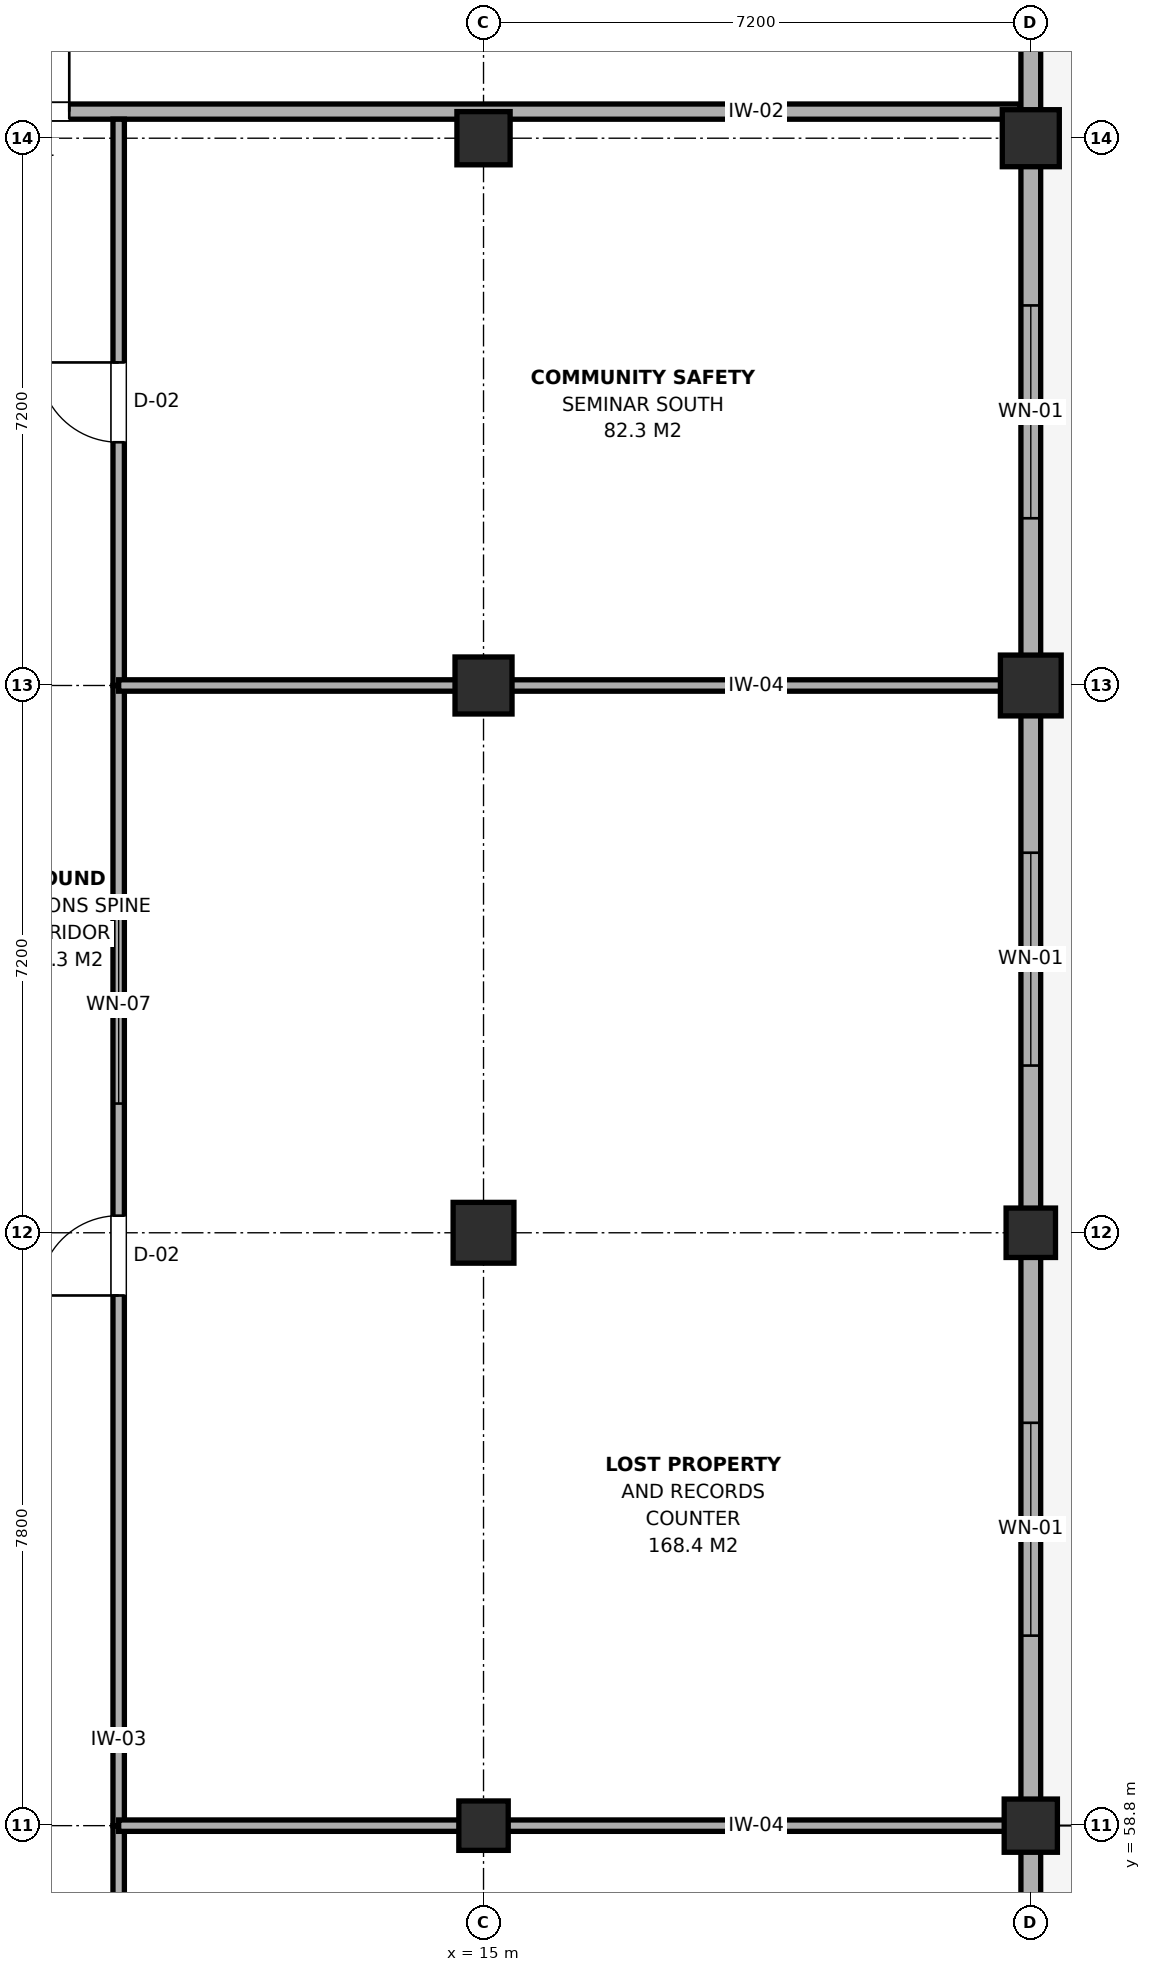
"""IFC4 building model, lengths in metres.
Left out: names, types, materials, properties, quantities, classifications, styles, units other than length and angle.
Written with IfcOpenShell. Run it as: python <this file> out.ifc"""

import sys

from ifc_helpers import new_model, si_unit, direction, frame, frame_2d, origin, origin_2d, place, context, subcontext, project, spatial, rectangle, extrude, element, fill, save


model = new_model("IFC4")
c1 = context("Model", 3, precision=1e-05, world=origin(), true_north=direction((0.0, 1.0)))
c2 = subcontext(c1, "Body", "Model", "MODEL_VIEW")
j1 = project(units=[si_unit("LENGTHUNIT", "METRE"), si_unit("PLANEANGLEUNIT", "RADIAN")], contexts=[c1])
p1 = place(None, origin())
s1 = spatial("IfcSite", under=j1, at=p1, CompositionType="ELEMENT")
p2 = place(p1, origin())
s2 = spatial("IfcBuilding", under=s1, at=p2, CompositionType="ELEMENT")
p3 = place(p2, origin())
s3 = spatial("IfcBuildingStorey", under=s2, at=p3, CompositionType="ELEMENT", Elevation=0.0)
p4 = place(p3, frame((15.0, 58.8, 0.0), z_axis=(0.0, 0.0, 1.0), x_axis=(1.0, 0.0, 0.0)))
e1 = element("IfcColumn", 1, at=p4, inside=s3, PredefinedType="COLUMN", context=c2, shape_type="SweptSolid", body=[
    extrude(rectangle(XDim=0.65, YDim=0.65, at=origin_2d()), origin(), (0.0, 0.0, 1.0), 4.8),
])
p5 = place(p3, frame((15.0, 66.6, 0.0), z_axis=(0.0, 0.0, 1.0), x_axis=(1.0, 0.0, 0.0)))
e2 = element("IfcColumn", 2, at=p5, inside=s3, PredefinedType="COLUMN", context=c2, shape_type="SweptSolid", body=[
    extrude(rectangle(XDim=0.8, YDim=0.8, at=origin_2d()), origin(), (0.0, 0.0, 1.0), 4.8),
])
p6 = place(p3, frame((15.0, 73.8, 0.0), z_axis=(0.0, 0.0, 1.0), x_axis=(1.0, 0.0, 0.0)))
e3 = element("IfcColumn", 3, at=p6, inside=s3, PredefinedType="COLUMN", context=c2, shape_type="SweptSolid", body=[
    extrude(rectangle(XDim=0.75, YDim=0.75, at=origin_2d()), origin(), (0.0, 0.0, 1.0), 4.8),
])
for number, where, z_axis, x_axis in (
    (4, (15.0, 81.0, 0.0), (0.0, 0.0, 1.0), (1.0, 0.0, 0.0)),
    (5, (22.2, 58.8, 0.0), (0.0, 0.0, 1.0), (1.0, 0.0, 0.0)),
):
    element("IfcColumn", number, at=place(p3, frame(where, z_axis=z_axis, x_axis=x_axis)), inside=s3, PredefinedType="COLUMN", context=c2, shape_type="SweptSolid", body=[
        extrude(rectangle(XDim=0.7, YDim=0.7, at=origin_2d()), origin(), (0.0, 0.0, 1.0), 4.8),
    ])
p7 = place(p3, frame((22.2, 66.6, 0.0), z_axis=(0.0, 0.0, 1.0), x_axis=(1.0, 0.0, 0.0)))
e6 = element("IfcColumn", 6, at=p7, inside=s3, PredefinedType="COLUMN", context=c2, shape_type="SweptSolid", body=[
    extrude(rectangle(XDim=0.65, YDim=0.65, at=origin_2d()), origin(), (0.0, 0.0, 1.0), 4.8),
])
p8 = place(p3, frame((22.2, 73.8, 0.0), z_axis=(0.0, 0.0, 1.0), x_axis=(1.0, 0.0, 0.0)))
e7 = element("IfcColumn", 7, at=p8, inside=s3, PredefinedType="COLUMN", context=c2, shape_type="SweptSolid", body=[
    extrude(rectangle(XDim=0.8, YDim=0.8, at=origin_2d()), origin(), (0.0, 0.0, 1.0), 4.8),
])
p9 = place(p3, frame((22.2, 81.0, 0.0), z_axis=(0.0, 0.0, 1.0), x_axis=(1.0, 0.0, 0.0)))
e8 = element("IfcColumn", 8, at=p9, inside=s3, PredefinedType="COLUMN", context=c2, shape_type="SweptSolid", body=[
    extrude(rectangle(XDim=0.75, YDim=0.75, at=origin_2d()), origin(), (0.0, 0.0, 1.0), 4.8),
])
p10 = place(p3, frame((22.2, 53.2, 0.0), z_axis=(0.0, 0.0, 1.0), x_axis=(0.0, 1.0, 0.0)))
e9 = element("IfcWall", 9, at=p10, inside=s3, PredefinedType="SOLIDWALL", context=c2, shape_type="SweptSolid", body=[
    extrude(rectangle(XDim=5.6, YDim=0.26, at=frame_2d((2.8, 0.0))), origin(), (0.0, 0.0, 1.0), 3.955),
])
p11 = place(p10, frame((1.4, 0.0, 0.9)))
e10 = element("IfcOpeningElement", 10, at=p11, cuts=e9, PredefinedType="OPENING", context=c2, shape_type="SweptSolid", body=[
    extrude(rectangle(XDim=2.8, YDim=2.2, at=frame_2d((1.4, 1.1))), frame((0.0, 0.145, 0.0), z_axis=(0.0, -1.0, 0.0), x_axis=(1.0, 0.0, 0.0)), (0.0, 0.0, 1.0), 0.29),
])
p12 = place(p3, frame((22.2, 58.8, 0.0), z_axis=(0.0, 0.0, 1.0), x_axis=(0.0, 1.0, 0.0)))
e11 = element("IfcWall", 11, at=p12, inside=s3, PredefinedType="SOLIDWALL", context=c2, shape_type="SweptSolid", body=[
    extrude(rectangle(XDim=7.8, YDim=0.26, at=frame_2d((3.9, 0.0))), origin(), (0.0, 0.0, 1.0), 4.005),
])
p13 = place(p12, frame((2.5, 0.0, 0.9)))
e12 = element("IfcOpeningElement", 12, at=p13, cuts=e11, PredefinedType="OPENING", context=c2, shape_type="SweptSolid", body=[
    extrude(rectangle(XDim=2.8, YDim=2.2, at=frame_2d((1.4, 1.1))), frame((0.0, 0.145, 0.0), z_axis=(0.0, -1.0, 0.0), x_axis=(1.0, 0.0, 0.0)), (0.0, 0.0, 1.0), 0.29),
])
p14 = place(p3, frame((22.2, 66.6, 0.0), z_axis=(0.0, 0.0, 1.0), x_axis=(0.0, 1.0, 0.0)))
e13 = element("IfcWall", 13, at=p14, inside=s3, PredefinedType="SOLIDWALL", context=c2, shape_type="SweptSolid", body=[
    extrude(rectangle(XDim=7.2, YDim=0.26, at=frame_2d((3.6, 0.0))), origin(), (0.0, 0.0, 1.0), 4.055),
])
p15 = place(p14, frame((2.2, 0.0, 0.9)))
e14 = element("IfcOpeningElement", 14, at=p15, cuts=e13, PredefinedType="OPENING", context=c2, shape_type="SweptSolid", body=[
    extrude(rectangle(XDim=2.8, YDim=2.2, at=frame_2d((1.4, 1.1))), frame((0.0, 0.145, 0.0), z_axis=(0.0, -1.0, 0.0), x_axis=(1.0, 0.0, 0.0)), (0.0, 0.0, 1.0), 0.29),
])
p16 = place(p3, frame((22.2, 73.8, 0.0), z_axis=(0.0, 0.0, 1.0), x_axis=(0.0, 1.0, 0.0)))
e15 = element("IfcWall", 15, at=p16, inside=s3, PredefinedType="SOLIDWALL", context=c2, shape_type="SweptSolid", body=[
    extrude(rectangle(XDim=7.2, YDim=0.26, at=frame_2d((3.6, 0.0))), origin(), (0.0, 0.0, 1.0), 4.105),
])
p17 = place(p16, frame((2.2, 0.0, 0.9)))
e16 = element("IfcOpeningElement", 16, at=p17, cuts=e15, PredefinedType="OPENING", context=c2, shape_type="SweptSolid", body=[
    extrude(rectangle(XDim=2.8, YDim=2.2, at=frame_2d((1.4, 1.1))), frame((0.0, 0.145, 0.0), z_axis=(0.0, -1.0, 0.0), x_axis=(1.0, 0.0, 0.0)), (0.0, 0.0, 1.0), 0.29),
])
p18 = place(p3, frame((22.2, 81.0, 0.0), z_axis=(0.0, 0.0, 1.0), x_axis=(0.0, 1.0, 0.0)))
e17 = element("IfcWall", 17, at=p18, inside=s3, PredefinedType="SOLIDWALL", context=c2, shape_type="SweptSolid", body=[
    extrude(rectangle(XDim=7.2, YDim=0.26, at=frame_2d((3.6, 0.0))), origin(), (0.0, 0.0, 1.0), 4.205),
])
p19 = place(p18, frame((1.3, 0.0, 0.0)))
e18 = element("IfcOpeningElement", 18, at=p19, cuts=e17, PredefinedType="OPENING", context=c2, shape_type="SweptSolid", body=[
    extrude(rectangle(XDim=2.0, YDim=2.25, at=frame_2d((1.0, 1.125))), frame((0.0, 0.145, 0.0), z_axis=(0.0, -1.0, 0.0), x_axis=(1.0, 0.0, 0.0)), (0.0, 0.0, 1.0), 0.29),
])
p20 = place(p3, frame((7.75, 81.35, 0.0), z_axis=(0.0, 0.0, 1.0), x_axis=(1.0, 0.0, 0.0)))
e19 = element("IfcWall", 19, at=p20, inside=s3, PredefinedType="PARTITIONING", context=c2, shape_type="SweptSolid", body=[
    extrude(rectangle(XDim=14.31, YDim=0.2, at=frame_2d((7.155, 0.0))), origin(), (0.0, 0.0, 1.0), 4.205),
])
p21 = place(p20, frame((0.7, 0.0, 0.0)))
e20 = element("IfcOpeningElement", 20, at=p21, cuts=e19, PredefinedType="OPENING", context=c2, shape_type="SweptSolid", body=[
    extrude(rectangle(XDim=1.1, YDim=2.15, at=frame_2d((0.55, 1.075))), frame((0.0, 0.115, 0.0), z_axis=(0.0, -1.0, 0.0), x_axis=(1.0, 0.0, 0.0)), (0.0, 0.0, 1.0), 0.23),
])
p22 = place(p3, frame((10.2, 36.4, 0.0), z_axis=(0.0, 0.0, 1.0), x_axis=(0.0, 1.0, 0.0)))
e21 = element("IfcWall", 21, at=p22, inside=s3, PredefinedType="PARTITIONING", context=c2, shape_type="SweptSolid", body=[
    extrude(rectangle(XDim=22.4, YDim=0.15, at=frame_2d((11.2, 0.0))), origin(), (0.0, 0.0, 1.0), 4.055),
])
p23 = place(p22, frame((10.4, 0.0, 0.0)))
e22 = element("IfcOpeningElement", 22, at=p23, cuts=e21, PredefinedType="OPENING", context=c2, shape_type="SweptSolid", body=[
    extrude(rectangle(XDim=1.6, YDim=2.15, at=frame_2d((0.8, 1.075))), frame((0.0, 0.09, 0.0), z_axis=(0.0, -1.0, 0.0), x_axis=(1.0, 0.0, 0.0)), (0.0, 0.0, 1.0), 0.18),
])
p24 = place(p22, frame((4.3, 0.0, 0.95)))
e23 = element("IfcOpeningElement", 23, at=p24, cuts=e21, PredefinedType="OPENING", context=c2, shape_type="SweptSolid", body=[
    extrude(rectangle(XDim=2.6, YDim=1.5, at=frame_2d((1.3, 0.75))), frame((0.0, 0.09, 0.0), z_axis=(0.0, -1.0, 0.0), x_axis=(1.0, 0.0, 0.0)), (0.0, 0.0, 1.0), 0.18),
])
p25 = place(p22, frame((15.5, 0.0, 0.95)))
e24 = element("IfcOpeningElement", 24, at=p25, cuts=e21, PredefinedType="OPENING", context=c2, shape_type="SweptSolid", body=[
    extrude(rectangle(XDim=2.6, YDim=1.5, at=frame_2d((1.3, 0.75))), frame((0.0, 0.09, 0.0), z_axis=(0.0, -1.0, 0.0), x_axis=(1.0, 0.0, 0.0)), (0.0, 0.0, 1.0), 0.18),
])
p26 = place(p3, frame((10.2, 58.8, 0.0), z_axis=(0.0, 0.0, 1.0), x_axis=(0.0, 1.0, 0.0)))
e25 = element("IfcWall", 25, at=p26, inside=s3, PredefinedType="PARTITIONING", context=c2, shape_type="SweptSolid", body=[
    extrude(rectangle(XDim=15.0, YDim=0.15, at=frame_2d((7.5, 0.0))), origin(), (0.0, 0.0, 1.0), 4.005),
])
p27 = place(p26, frame((6.975, 0.0, 0.0)))
e26 = element("IfcOpeningElement", 26, at=p27, cuts=e25, PredefinedType="OPENING", context=c2, shape_type="SweptSolid", body=[
    extrude(rectangle(XDim=1.05, YDim=2.15, at=frame_2d((0.525, 1.075))), frame((0.0, 0.09, 0.0), z_axis=(0.0, -1.0, 0.0), x_axis=(1.0, 0.0, 0.0)), (0.0, 0.0, 1.0), 0.18),
])
p28 = place(p26, frame((9.5, 0.0, 0.95)))
e27 = element("IfcOpeningElement", 27, at=p28, cuts=e25, PredefinedType="OPENING", context=c2, shape_type="SweptSolid", body=[
    extrude(rectangle(XDim=2.6, YDim=1.5, at=frame_2d((1.3, 0.75))), frame((0.0, 0.09, 0.0), z_axis=(0.0, -1.0, 0.0), x_axis=(1.0, 0.0, 0.0)), (0.0, 0.0, 1.0), 0.18),
])
p29 = place(p3, frame((10.2, 58.8, 0.0), z_axis=(0.0, 0.0, 1.0), x_axis=(1.0, 0.0, 0.0)))
e28 = element("IfcWall", 28, at=p29, inside=s3, PredefinedType="PARTITIONING", context=c2, shape_type="SweptSolid", body=[
    extrude(rectangle(XDim=11.86, YDim=0.15, at=frame_2d((5.93, 0.0))), origin(), (0.0, 0.0, 1.0), 3.955),
])
p30 = place(p3, frame((10.2, 73.8, 0.0), z_axis=(0.0, 0.0, 1.0), x_axis=(0.0, 1.0, 0.0)))
e29 = element("IfcWall", 29, at=p30, inside=s3, PredefinedType="PARTITIONING", context=c2, shape_type="SweptSolid", body=[
    extrude(rectangle(XDim=7.45, YDim=0.15, at=frame_2d((3.725, 0.0))), origin(), (0.0, 0.0, 1.0), 4.005),
])
p31 = place(p30, frame((3.2, 0.0, 0.0)))
e30 = element("IfcOpeningElement", 30, at=p31, cuts=e29, PredefinedType="OPENING", context=c2, shape_type="SweptSolid", body=[
    extrude(rectangle(XDim=1.05, YDim=2.15, at=frame_2d((0.525, 1.075))), frame((0.0, 0.09, 0.0), z_axis=(0.0, -1.0, 0.0), x_axis=(1.0, 0.0, 0.0)), (0.0, 0.0, 1.0), 0.18),
])
p32 = place(p3, frame((10.2, 73.8, 0.0), z_axis=(0.0, 0.0, 1.0), x_axis=(1.0, 0.0, 0.0)))
e31 = element("IfcWall", 31, at=p32, inside=s3, PredefinedType="PARTITIONING", context=c2, shape_type="SweptSolid", body=[
    extrude(rectangle(XDim=11.86, YDim=0.15, at=frame_2d((5.93, 0.0))), origin(), (0.0, 0.0, 1.0), 4.205),
])
p33 = place(p13, origin())
e32 = element("IfcWindow", 32, at=p33, inside=s3, PartitioningType="SINGLE_PANEL", PredefinedType="WINDOW", context=c2, shape_type="SweptSolid", body=[
    extrude(rectangle(XDim=2.8, YDim=2.2, at=frame_2d((1.4, 1.1))), frame((0.0, 0.03, 0.0), z_axis=(0.0, -1.0, 0.0), x_axis=(1.0, 0.0, 0.0)), (0.0, 0.0, 1.0), 0.06),
])
fill(e12, e32)
p34 = place(p15, origin())
e33 = element("IfcWindow", 33, at=p34, inside=s3, PartitioningType="SINGLE_PANEL", PredefinedType="WINDOW", context=c2, shape_type="SweptSolid", body=[
    extrude(rectangle(XDim=2.8, YDim=2.2, at=frame_2d((1.4, 1.1))), frame((0.0, 0.03, 0.0), z_axis=(0.0, -1.0, 0.0), x_axis=(1.0, 0.0, 0.0)), (0.0, 0.0, 1.0), 0.06),
])
fill(e14, e33)
p35 = place(p17, origin())
e34 = element("IfcWindow", 34, at=p35, inside=s3, PartitioningType="SINGLE_PANEL", PredefinedType="WINDOW", context=c2, shape_type="SweptSolid", body=[
    extrude(rectangle(XDim=2.8, YDim=2.2, at=frame_2d((1.4, 1.1))), frame((0.0, 0.03, 0.0), z_axis=(0.0, -1.0, 0.0), x_axis=(1.0, 0.0, 0.0)), (0.0, 0.0, 1.0), 0.06),
])
fill(e16, e34)
p36 = place(p21, origin())
e35 = element("IfcDoor", 35, at=p36, inside=s3, OperationType="SINGLE_SWING_RIGHT", PredefinedType="DOOR", context=c2, shape_type="SweptSolid", body=[
    extrude(rectangle(XDim=1.1, YDim=2.15, at=frame_2d((0.55, 1.075))), frame((0.0, 0.025, 0.0), z_axis=(0.0, -1.0, 0.0), x_axis=(1.0, 0.0, 0.0)), (0.0, 0.0, 1.0), 0.05),
])
fill(e20, e35)
p37 = place(p27, origin())
e36 = element("IfcDoor", 36, at=p37, inside=s3, OperationType="SINGLE_SWING_LEFT", PredefinedType="DOOR", context=c2, shape_type="SweptSolid", body=[
    extrude(rectangle(XDim=1.05, YDim=2.15, at=frame_2d((0.525, 1.075))), frame((0.0, 0.025, 0.0), z_axis=(0.0, -1.0, 0.0), x_axis=(1.0, 0.0, 0.0)), (0.0, 0.0, 1.0), 0.05),
])
fill(e26, e36)
p38 = place(p28, origin())
e37 = element("IfcWindow", 37, at=p38, inside=s3, PartitioningType="SINGLE_PANEL", PredefinedType="WINDOW", context=c2, shape_type="SweptSolid", body=[
    extrude(rectangle(XDim=2.6, YDim=1.5, at=frame_2d((1.3, 0.75))), frame((0.0, 0.03, 0.0), z_axis=(0.0, -1.0, 0.0), x_axis=(1.0, 0.0, 0.0)), (0.0, 0.0, 1.0), 0.06),
])
fill(e27, e37)
p39 = place(p31, origin())
e38 = element("IfcDoor", 38, at=p39, inside=s3, OperationType="SINGLE_SWING_RIGHT", PredefinedType="DOOR", context=c2, shape_type="SweptSolid", body=[
    extrude(rectangle(XDim=1.05, YDim=2.15, at=frame_2d((0.525, 1.075))), frame((0.0, 0.025, 0.0), z_axis=(0.0, -1.0, 0.0), x_axis=(1.0, 0.0, 0.0)), (0.0, 0.0, 1.0), 0.05),
])
fill(e30, e38)
save(model, sys.argv[1])
